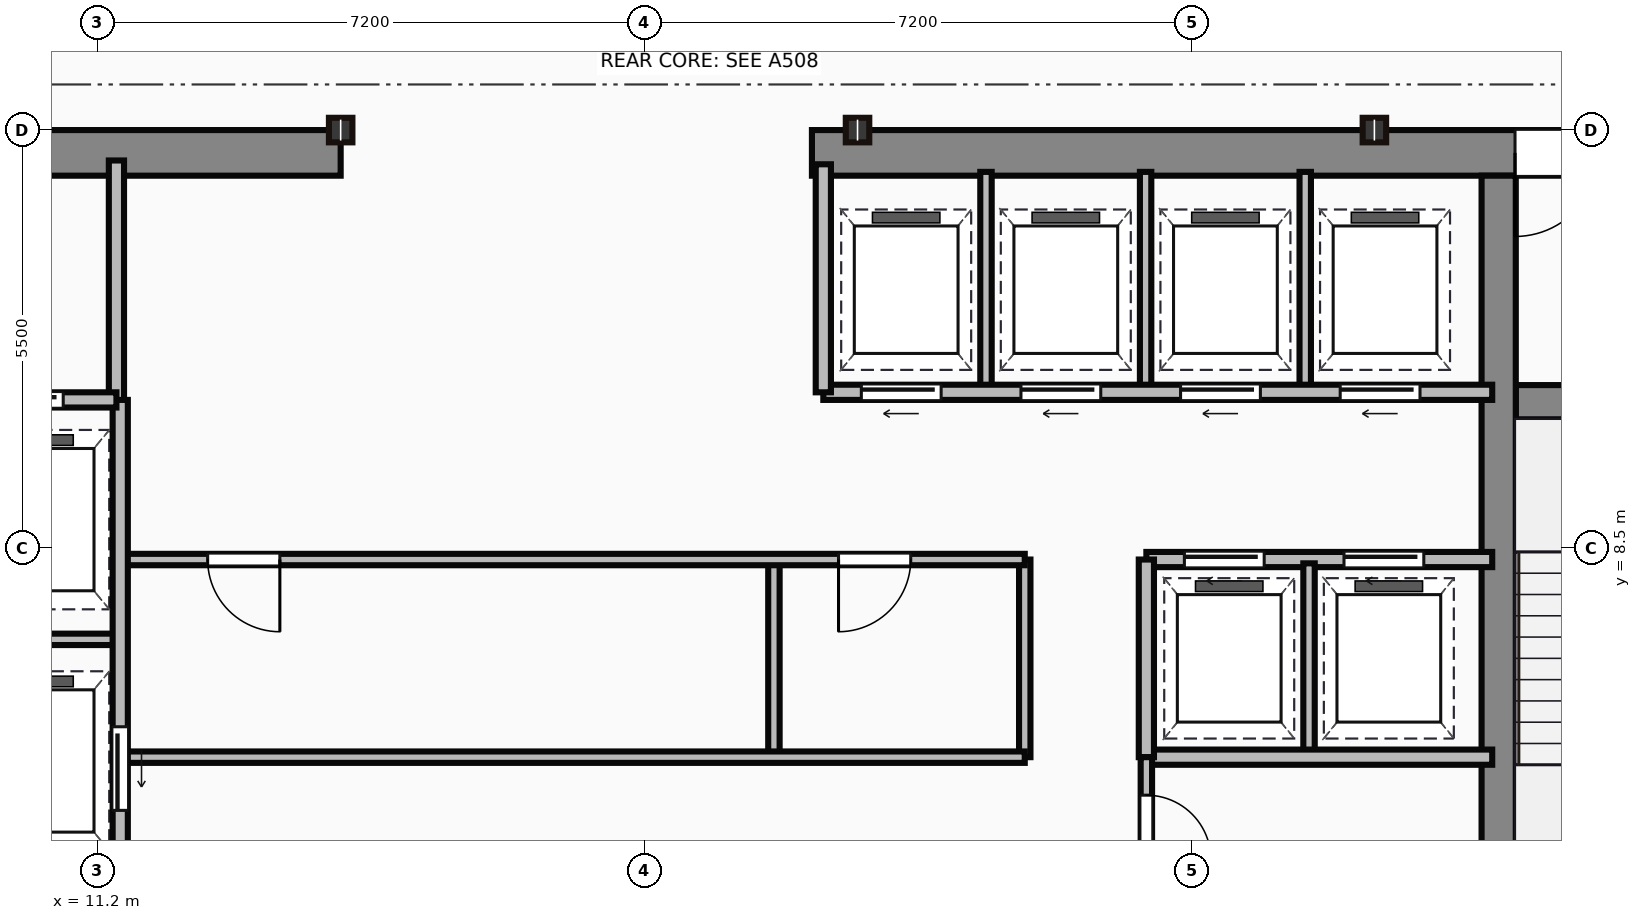
"""IFC4 building model, lengths in metres.
Left out: names, types, materials, properties, quantities, classifications, styles, units other than length and angle.
Written with IfcOpenShell. Run it as: python <this file> out.ifc"""

import sys

from ifc_helpers import new_model, si_unit, direction, frame, frame_2d, origin, origin_2d, place, context, subcontext, project, spatial, rectangle, i_section, extrude, source, transform, mapped, element, fill, save


model = new_model("IFC4")
c1 = context("Model", 3, precision=1e-05, world=origin(), true_north=direction((0.0, 1.0)))
c2 = subcontext(c1, "Body", "Model", "MODEL_VIEW")
j1 = project(units=[si_unit("LENGTHUNIT", "METRE"), si_unit("PLANEANGLEUNIT", "RADIAN")], contexts=[c1])
p1 = place(None, origin())
s1 = spatial("IfcSite", under=j1, at=p1, CompositionType="ELEMENT")
p2 = place(p1, origin())
s2 = spatial("IfcBuilding", under=s1, at=p2, CompositionType="ELEMENT")
p3 = place(p2, frame((0.0, 0.0, 195.9)))
s3 = spatial("IfcBuildingStorey", under=s2, at=p3, CompositionType="ELEMENT", Elevation=195.9)
m1 = source(origin(), c2, "Body", "SweptSolid", [
    extrude(rectangle(XDim=9.1, YDim=0.6, at=frame_2d((4.55, 0.0))), origin(), (0.0, 0.0, 1.0), 3.65),
])
p4 = place(p3, frame((5.3, 13.7, 0.0), z_axis=(0.0, 0.0, 1.0), x_axis=(1.0, 0.0, 0.0)))
e1 = element("IfcWall", 1, at=p4, inside=s3, PredefinedType="SHEAR", context=c2, shape_type="MappedRepresentation", body=[
    mapped(m1, transform((0.0, 0.0, 0.0))),
])
p5 = place(p4, frame((4.1, 0.0, 0.0)))
e2 = element("IfcOpeningElement", 2, at=p5, cuts=e1, PredefinedType="OPENING", context=c2, shape_type="SweptSolid", body=[
    extrude(rectangle(XDim=1.1, YDim=2.15, at=frame_2d((0.55, 1.075))), frame((0.0, 0.31, 0.0), z_axis=(0.0, -1.0, 0.0), x_axis=(1.0, 0.0, 0.0)), (0.0, 0.0, 1.0), 0.62),
])
m2 = source(origin(), c2, "Body", "SweptSolid", [
    extrude(rectangle(XDim=12.6, YDim=0.6, at=frame_2d((6.3, 0.0))), origin(), (0.0, 0.0, 1.0), 3.65),
])
p6 = place(p3, frame((20.6, 13.7, 0.0), z_axis=(0.0, 0.0, 1.0), x_axis=(1.0, 0.0, 0.0)))
e3 = element("IfcWall", 3, at=p6, inside=s3, PredefinedType="SHEAR", context=c2, shape_type="MappedRepresentation", body=[
    mapped(m2, transform((0.0, 0.0, 0.0))),
])
p7 = place(p6, frame((9.25, 0.0, 0.0)))
e4 = element("IfcOpeningElement", 4, at=p7, cuts=e3, PredefinedType="OPENING", context=c2, shape_type="SweptSolid", body=[
    extrude(rectangle(XDim=1.1, YDim=2.15, at=frame_2d((0.55, 1.075))), frame((0.0, 0.31, 0.0), z_axis=(0.0, -1.0, 0.0), x_axis=(1.0, 0.0, 0.0)), (0.0, 0.0, 1.0), 0.62),
])
m3 = source(origin(), c2, "Body", "SweptSolid", [
    extrude(rectangle(XDim=12.5, YDim=0.45, at=frame_2d((6.25, 0.0))), origin(), (0.0, 0.0, 1.0), 3.65),
])
p8 = place(p3, frame((29.635, 0.9, 0.0), z_axis=(0.0, 0.0, 1.0), x_axis=(0.0, 1.0, 0.0)))
e5 = element("IfcWall", 5, at=p8, inside=s3, PredefinedType="SHEAR", context=c2, shape_type="MappedRepresentation", body=[
    mapped(m3, transform((0.0, 0.0, 0.0))),
])
m4 = source(origin(), c2, "Body", "SweptSolid", [
    extrude(rectangle(XDim=3.39, YDim=0.45, at=frame_2d((1.695, 0.0))), origin(), (0.0, 0.0, 1.0), 3.65),
])
p9 = place(p3, frame((29.86, 10.42, 0.0), z_axis=(0.0, 0.0, 1.0), x_axis=(1.0, 0.0, 0.0)))
e6 = element("IfcWall", 6, at=p9, inside=s3, PredefinedType="SHEAR", context=c2, shape_type="MappedRepresentation", body=[
    mapped(m4, transform((0.0, 0.0, 0.0))),
])
p10 = place(p9, frame((1.1, 0.0, 0.0)))
e7 = element("IfcOpeningElement", 7, at=p10, cuts=e6, PredefinedType="OPENING", context=c2, shape_type="SweptSolid", body=[
    extrude(rectangle(XDim=1.1, YDim=2.15, at=frame_2d((0.55, 1.075))), frame((0.0, 0.235, 0.0), z_axis=(0.0, -1.0, 0.0), x_axis=(1.0, 0.0, 0.0)), (0.0, 0.0, 1.0), 0.47),
])
m5 = source(origin(), c2, "Body", "SweptSolid", [
    extrude(i_section(OverallWidth=0.309, OverallDepth=0.323, WebThickness=0.014, FlangeThickness=0.023, at=origin_2d()), origin(), (0.0, 0.0, 1.0), 3.65),
])
for number, where, z_axis, x_axis in (
    (8, (14.4, 14.0, 0.0), (0.0, 0.0, 1.0), (1.0, 0.0, 0.0)),
    (9, (21.2, 14.0, 0.0), (0.0, 0.0, 1.0), (1.0, 0.0, 0.0)),
    (10, (28.0, 14.0, 0.0), (0.0, 0.0, 1.0), (1.0, 0.0, 0.0)),
):
    element("IfcColumn", number, at=place(p3, frame(where, z_axis=z_axis, x_axis=x_axis)), inside=s3, PredefinedType="COLUMN", context=c2, shape_type="MappedRepresentation", body=[
        mapped(m5, transform((0.0, 0.0, 0.0))),
    ])
m6 = source(origin(), c2, "Body", "SweptSolid", [
    extrude(rectangle(XDim=3.18, YDim=0.2, at=frame_2d((1.59, 0.0))), origin(), (0.0, 0.0, 1.0), 3.4),
])
p11 = place(p3, frame((11.45, 10.42, 0.0), z_axis=(0.0, 0.0, 1.0), x_axis=(0.0, 1.0, 0.0)))
e11 = element("IfcWall", 11, at=p11, inside=s3, PredefinedType="PARTITIONING", context=c2, shape_type="MappedRepresentation", body=[
    mapped(m6, transform((0.0, 0.0, 0.0))),
])
m7 = source(origin(), c2, "Body", "SweptSolid", [
    extrude(rectangle(XDim=2.35, YDim=0.2, at=frame_2d((1.175, 0.0))), origin(), (0.0, 0.0, 1.0), 3.4),
])
p12 = place(p3, frame((9.1, 10.45, 0.0), z_axis=(0.0, 0.0, 1.0), x_axis=(1.0, 0.0, 0.0)))
e12 = element("IfcWall", 12, at=p12, inside=s3, PredefinedType="PARTITIONING", context=c2, shape_type="MappedRepresentation", body=[
    mapped(m7, transform((0.0, 0.0, 0.0))),
])
p13 = place(p12, frame((0.55, 0.0, 0.0)))
e13 = element("IfcOpeningElement", 13, at=p13, cuts=e12, PredefinedType="OPENING", context=c2, shape_type="SweptSolid", body=[
    extrude(rectangle(XDim=1.1, YDim=2.15, at=frame_2d((0.55, 1.075))), frame((0.0, 0.11, 0.0), z_axis=(0.0, -1.0, 0.0), x_axis=(1.0, 0.0, 0.0)), (0.0, 0.0, 1.0), 0.22),
])
m8 = source(origin(), c2, "Body", "SweptSolid", [
    extrude(rectangle(XDim=9.6, YDim=0.2, at=frame_2d((4.8, 0.0))), origin(), (0.0, 0.0, 1.0), 3.4),
])
p14 = place(p3, frame((11.5, 0.85, 0.0), z_axis=(0.0, 0.0, 1.0), x_axis=(0.0, 1.0, 0.0)))
e14 = element("IfcWall", 14, at=p14, inside=s3, PredefinedType="PARTITIONING", context=c2, shape_type="MappedRepresentation", body=[
    mapped(m8, transform((0.0, 0.0, 0.0))),
])
p15 = place(p14, frame((4.2, 0.0, 0.0)))
e15 = element("IfcOpeningElement", 15, at=p15, cuts=e14, PredefinedType="OPENING", context=c2, shape_type="SweptSolid", body=[
    extrude(rectangle(XDim=1.1, YDim=2.15, at=frame_2d((0.55, 1.075))), frame((0.0, 0.11, 0.0), z_axis=(0.0, -1.0, 0.0), x_axis=(1.0, 0.0, 0.0)), (0.0, 0.0, 1.0), 0.22),
])
p16 = place(p14, frame((0.9, 0.0, 0.0)))
e16 = element("IfcOpeningElement", 16, at=p16, cuts=e14, PredefinedType="OPENING", context=c2, shape_type="SweptSolid", body=[
    extrude(rectangle(XDim=1.2, YDim=2.15, at=frame_2d((0.6, 1.075))), frame((0.0, 0.11, 0.0), z_axis=(0.0, -1.0, 0.0), x_axis=(1.0, 0.0, 0.0)), (0.0, 0.0, 1.0), 0.22),
])
m9 = source(origin(), c2, "Body", "SweptSolid", [
    extrude(rectangle(XDim=2.4, YDim=0.15, at=frame_2d((1.2, 0.0))), origin(), (0.0, 0.0, 1.0), 3.4),
])
p17 = place(p3, frame((9.1, 7.3, 0.0), z_axis=(0.0, 0.0, 1.0), x_axis=(1.0, 0.0, 0.0)))
e17 = element("IfcWall", 17, at=p17, inside=s3, PredefinedType="PARTITIONING", context=c2, shape_type="MappedRepresentation", body=[
    mapped(m9, transform((0.0, 0.0, 0.0))),
])
m10 = source(origin(), c2, "Body", "SweptSolid", [
    extrude(rectangle(XDim=11.85, YDim=0.15, at=frame_2d((5.925, 0.0))), origin(), (0.0, 0.0, 1.0), 3.4),
])
p18 = place(p3, frame((11.55, 5.75, 0.0), z_axis=(0.0, 0.0, 1.0), x_axis=(1.0, 0.0, 0.0)))
e18 = element("IfcWall", 18, at=p18, inside=s3, PredefinedType="PARTITIONING", context=c2, shape_type="MappedRepresentation", body=[
    mapped(m10, transform((0.0, 0.0, 0.0))),
])
p19 = place(p3, frame((11.55, 8.35, 0.0), z_axis=(0.0, 0.0, 1.0), x_axis=(1.0, 0.0, 0.0)))
e19 = element("IfcWall", 19, at=p19, inside=s3, PredefinedType="PARTITIONING", context=c2, shape_type="MappedRepresentation", body=[
    mapped(m10, transform((0.0, 0.0, 0.0))),
])
p20 = place(p19, frame((1.1, 0.0, 0.0)))
e20 = element("IfcOpeningElement", 20, at=p20, cuts=e19, PredefinedType="OPENING", context=c2, shape_type="SweptSolid", body=[
    extrude(rectangle(XDim=0.95, YDim=2.15, at=frame_2d((0.475, 1.075))), frame((0.0, 0.085, 0.0), z_axis=(0.0, -1.0, 0.0), x_axis=(1.0, 0.0, 0.0)), (0.0, 0.0, 1.0), 0.17),
])
p21 = place(p19, frame((9.4, 0.0, 0.0)))
e21 = element("IfcOpeningElement", 21, at=p21, cuts=e19, PredefinedType="OPENING", context=c2, shape_type="SweptSolid", body=[
    extrude(rectangle(XDim=0.95, YDim=2.15, at=frame_2d((0.475, 1.075))), frame((0.0, 0.085, 0.0), z_axis=(0.0, -1.0, 0.0), x_axis=(1.0, 0.0, 0.0)), (0.0, 0.0, 1.0), 0.17),
])
m11 = source(origin(), c2, "Body", "SweptSolid", [
    extrude(rectangle(XDim=2.6, YDim=0.15, at=frame_2d((1.3, 0.0))), origin(), (0.0, 0.0, 1.0), 3.4),
])
p22 = place(p3, frame((23.4, 5.75, 0.0), z_axis=(0.0, 0.0, 1.0), x_axis=(0.0, 1.0, 0.0)))
e22 = element("IfcWall", 22, at=p22, inside=s3, PredefinedType="PARTITIONING", context=c2, shape_type="MappedRepresentation", body=[
    mapped(m11, transform((0.0, 0.0, 0.0))),
])
m12 = source(origin(), c2, "Body", "SweptSolid", [
    extrude(rectangle(XDim=2.5, YDim=0.15, at=frame_2d((1.25, 0.0))), origin(), (0.0, 0.0, 1.0), 3.4),
])
p23 = place(p3, frame((20.1, 5.8, 0.0), z_axis=(0.0, 0.0, 1.0), x_axis=(0.0, 1.0, 0.0)))
e23 = element("IfcWall", 23, at=p23, inside=s3, PredefinedType="PARTITIONING", context=c2, shape_type="MappedRepresentation", body=[
    mapped(m12, transform((0.0, 0.0, 0.0))),
])
m13 = source(origin(), c2, "Body", "SweptSolid", [
    extrude(rectangle(XDim=8.8, YDim=0.2, at=frame_2d((4.4, 0.0))), origin(), (0.0, 0.0, 1.0), 3.4),
])
p24 = place(p3, frame((20.75, 10.55, 0.0), z_axis=(0.0, 0.0, 1.0), x_axis=(1.0, 0.0, 0.0)))
e24 = element("IfcWall", 24, at=p24, inside=s3, PredefinedType="PARTITIONING", context=c2, shape_type="MappedRepresentation", body=[
    mapped(m13, transform((0.0, 0.0, 0.0))),
])
p25 = place(p24, frame((0.5, 0.0, 0.0)))
e25 = element("IfcOpeningElement", 25, at=p25, cuts=e24, PredefinedType="OPENING", context=c2, shape_type="SweptSolid", body=[
    extrude(rectangle(XDim=1.05, YDim=2.15, at=frame_2d((0.525, 1.075))), frame((0.0, 0.11, 0.0), z_axis=(0.0, -1.0, 0.0), x_axis=(1.0, 0.0, 0.0)), (0.0, 0.0, 1.0), 0.22),
])
p26 = place(p24, frame((2.6, 0.0, 0.0)))
e26 = element("IfcOpeningElement", 26, at=p26, cuts=e24, PredefinedType="OPENING", context=c2, shape_type="SweptSolid", body=[
    extrude(rectangle(XDim=1.05, YDim=2.15, at=frame_2d((0.525, 1.075))), frame((0.0, 0.11, 0.0), z_axis=(0.0, -1.0, 0.0), x_axis=(1.0, 0.0, 0.0)), (0.0, 0.0, 1.0), 0.22),
])
p27 = place(p24, frame((4.7, 0.0, 0.0)))
e27 = element("IfcOpeningElement", 27, at=p27, cuts=e24, PredefinedType="OPENING", context=c2, shape_type="SweptSolid", body=[
    extrude(rectangle(XDim=1.05, YDim=2.15, at=frame_2d((0.525, 1.075))), frame((0.0, 0.11, 0.0), z_axis=(0.0, -1.0, 0.0), x_axis=(1.0, 0.0, 0.0)), (0.0, 0.0, 1.0), 0.22),
])
p28 = place(p24, frame((6.8, 0.0, 0.0)))
e28 = element("IfcOpeningElement", 28, at=p28, cuts=e24, PredefinedType="OPENING", context=c2, shape_type="SweptSolid", body=[
    extrude(rectangle(XDim=1.05, YDim=2.15, at=frame_2d((0.525, 1.075))), frame((0.0, 0.11, 0.0), z_axis=(0.0, -1.0, 0.0), x_axis=(1.0, 0.0, 0.0)), (0.0, 0.0, 1.0), 0.22),
])
m14 = source(origin(), c2, "Body", "SweptSolid", [
    extrude(rectangle(XDim=3.0, YDim=0.2, at=frame_2d((1.5, 0.0))), origin(), (0.0, 0.0, 1.0), 3.4),
])
p29 = place(p3, frame((20.75, 10.55, 0.0), z_axis=(0.0, 0.0, 1.0), x_axis=(0.0, 1.0, 0.0)))
e29 = element("IfcWall", 29, at=p29, inside=s3, PredefinedType="PARTITIONING", context=c2, shape_type="MappedRepresentation", body=[
    mapped(m14, transform((0.0, 0.0, 0.0))),
])
m15 = source(origin(), c2, "Body", "SweptSolid", [
    extrude(rectangle(XDim=2.85, YDim=0.15, at=frame_2d((1.425, 0.0))), origin(), (0.0, 0.0, 1.0), 3.4),
])
for number, where, z_axis, x_axis in (
    (30, (22.89, 10.6, 0.0), (0.0, 0.0, 1.0), (0.0, 1.0, 0.0)),
    (31, (24.99, 10.6, 0.0), (0.0, 0.0, 1.0), (0.0, 1.0, 0.0)),
    (32, (27.09, 10.6, 0.0), (0.0, 0.0, 1.0), (0.0, 1.0, 0.0)),
):
    element("IfcWall", number, at=place(p3, frame(where, z_axis=z_axis, x_axis=x_axis)), inside=s3, PredefinedType="PARTITIONING", context=c2, shape_type="MappedRepresentation", body=[
        mapped(m15, transform((0.0, 0.0, 0.0))),
    ])
m16 = source(origin(), c2, "Body", "SweptSolid", [
    extrude(rectangle(XDim=4.55, YDim=0.2, at=frame_2d((2.275, 0.0))), origin(), (0.0, 0.0, 1.0), 3.4),
])
p30 = place(p3, frame((25.0, 8.35, 0.0), z_axis=(0.0, 0.0, 1.0), x_axis=(1.0, 0.0, 0.0)))
e33 = element("IfcWall", 33, at=p30, inside=s3, PredefinedType="PARTITIONING", context=c2, shape_type="MappedRepresentation", body=[
    mapped(m16, transform((0.0, 0.0, 0.0))),
])
p31 = place(p30, frame((0.5, 0.0, 0.0)))
e34 = element("IfcOpeningElement", 34, at=p31, cuts=e33, PredefinedType="OPENING", context=c2, shape_type="SweptSolid", body=[
    extrude(rectangle(XDim=1.05, YDim=2.15, at=frame_2d((0.525, 1.075))), frame((0.0, 0.11, 0.0), z_axis=(0.0, -1.0, 0.0), x_axis=(1.0, 0.0, 0.0)), (0.0, 0.0, 1.0), 0.22),
])
p32 = place(p30, frame((2.6, 0.0, 0.0)))
e35 = element("IfcOpeningElement", 35, at=p32, cuts=e33, PredefinedType="OPENING", context=c2, shape_type="SweptSolid", body=[
    extrude(rectangle(XDim=1.05, YDim=2.15, at=frame_2d((0.525, 1.075))), frame((0.0, 0.11, 0.0), z_axis=(0.0, -1.0, 0.0), x_axis=(1.0, 0.0, 0.0)), (0.0, 0.0, 1.0), 0.22),
])
p33 = place(p3, frame((25.0, 5.75, 0.0), z_axis=(0.0, 0.0, 1.0), x_axis=(1.0, 0.0, 0.0)))
e36 = element("IfcWall", 36, at=p33, inside=s3, PredefinedType="PARTITIONING", context=c2, shape_type="MappedRepresentation", body=[
    mapped(m16, transform((0.0, 0.0, 0.0))),
])
m17 = source(origin(), c2, "Body", "SweptSolid", [
    extrude(rectangle(XDim=2.6, YDim=0.2, at=frame_2d((1.3, 0.0))), origin(), (0.0, 0.0, 1.0), 3.4),
])
p34 = place(p3, frame((25.0, 5.75, 0.0), z_axis=(0.0, 0.0, 1.0), x_axis=(0.0, 1.0, 0.0)))
e37 = element("IfcWall", 37, at=p34, inside=s3, PredefinedType="PARTITIONING", context=c2, shape_type="MappedRepresentation", body=[
    mapped(m17, transform((0.0, 0.0, 0.0))),
])
p35 = place(p3, frame((27.14, 5.8, 0.0), z_axis=(0.0, 0.0, 1.0), x_axis=(0.0, 1.0, 0.0)))
e38 = element("IfcWall", 38, at=p35, inside=s3, PredefinedType="PARTITIONING", context=c2, shape_type="MappedRepresentation", body=[
    mapped(m12, transform((0.0, 0.0, 0.0))),
])
m18 = source(origin(), c2, "Body", "SweptSolid", [
    extrude(rectangle(XDim=4.9, YDim=0.15, at=frame_2d((2.45, 0.0))), origin(), (0.0, 0.0, 1.0), 3.4),
])
p36 = place(p3, frame((25.0, 0.85, 0.0), z_axis=(0.0, 0.0, 1.0), x_axis=(0.0, 1.0, 0.0)))
e39 = element("IfcWall", 39, at=p36, inside=s3, PredefinedType="PARTITIONING", context=c2, shape_type="MappedRepresentation", body=[
    mapped(m18, transform((0.0, 0.0, 0.0))),
])
p37 = place(p36, frame((1.85, 0.0, 0.0)))
e40 = element("IfcOpeningElement", 40, at=p37, cuts=e39, PredefinedType="OPENING", context=c2, shape_type="SweptSolid", body=[
    extrude(rectangle(XDim=0.95, YDim=2.15, at=frame_2d((0.475, 1.075))), frame((0.0, 0.085, 0.0), z_axis=(0.0, -1.0, 0.0), x_axis=(1.0, 0.0, 0.0)), (0.0, 0.0, 1.0), 0.17),
])
p38 = place(p36, frame((3.55, 0.0, 0.0)))
e41 = element("IfcOpeningElement", 41, at=p38, cuts=e39, PredefinedType="OPENING", context=c2, shape_type="SweptSolid", body=[
    extrude(rectangle(XDim=0.85, YDim=2.15, at=frame_2d((0.425, 1.075))), frame((0.0, 0.085, 0.0), z_axis=(0.0, -1.0, 0.0), x_axis=(1.0, 0.0, 0.0)), (0.0, 0.0, 1.0), 0.17),
])
m19 = source(origin(), c2, "Body", "SweptSolid", [
    extrude(rectangle(XDim=1.1, YDim=2.15, at=frame_2d((0.55, 1.075))), frame((0.0, 0.025, 0.0), z_axis=(0.0, -1.0, 0.0), x_axis=(1.0, 0.0, 0.0)), (0.0, 0.0, 1.0), 0.05),
])
p39 = place(p7, origin())
e42 = element("IfcDoor", 42, at=p39, inside=s3, OperationType="SINGLE_SWING_LEFT", PredefinedType="DOOR", context=c2, shape_type="MappedRepresentation", body=[
    mapped(m19, transform((0.0, 0.0, 0.0))),
])
fill(e4, e42)
p40 = place(p13, origin())
e43 = element("IfcDoor", 43, at=p40, inside=s3, OperationType="SLIDING_TO_LEFT", PredefinedType="DOOR", context=c2, shape_type="MappedRepresentation", body=[
    mapped(m19, transform((0.0, 0.0, 0.0))),
])
fill(e13, e43)
p41 = place(p15, frame((1.1, 0.0, 0.0), z_axis=(0.0, 0.0, 1.0), x_axis=(-1.0, 0.0, 0.0)))
e44 = element("IfcDoor", 44, at=p41, inside=s3, OperationType="SLIDING_TO_LEFT", PredefinedType="DOOR", context=c2, shape_type="MappedRepresentation", body=[
    mapped(m19, transform((0.0, 0.0, 0.0))),
])
fill(e15, e44)
m20 = source(origin(), c2, "Body", "SweptSolid", [
    extrude(rectangle(XDim=0.95, YDim=2.15, at=frame_2d((0.475, 1.075))), frame((0.0, 0.025, 0.0), z_axis=(0.0, -1.0, 0.0), x_axis=(1.0, 0.0, 0.0)), (0.0, 0.0, 1.0), 0.05),
])
p42 = place(p20, origin())
e45 = element("IfcDoor", 45, at=p42, inside=s3, OperationType="SINGLE_SWING_RIGHT", PredefinedType="DOOR", context=c2, shape_type="MappedRepresentation", body=[
    mapped(m20, transform((0.0, 0.0, 0.0))),
])
fill(e20, e45)
p43 = place(p21, origin())
e46 = element("IfcDoor", 46, at=p43, inside=s3, OperationType="SINGLE_SWING_LEFT", PredefinedType="DOOR", context=c2, shape_type="MappedRepresentation", body=[
    mapped(m20, transform((0.0, 0.0, 0.0))),
])
fill(e21, e46)
m21 = source(origin(), c2, "Body", "SweptSolid", [
    extrude(rectangle(XDim=1.05, YDim=2.15, at=frame_2d((0.525, 1.075))), frame((0.0, 0.025, 0.0), z_axis=(0.0, -1.0, 0.0), x_axis=(1.0, 0.0, 0.0)), (0.0, 0.0, 1.0), 0.05),
])
p44 = place(p25, frame((1.05, 0.0, 0.0), z_axis=(0.0, 0.0, 1.0), x_axis=(-1.0, 0.0, 0.0)))
e47 = element("IfcDoor", 47, at=p44, inside=s3, OperationType="SLIDING_TO_LEFT", PredefinedType="DOOR", context=c2, shape_type="MappedRepresentation", body=[
    mapped(m21, transform((0.0, 0.0, 0.0))),
])
fill(e25, e47)
p45 = place(p26, frame((1.05, 0.0, 0.0), z_axis=(0.0, 0.0, 1.0), x_axis=(-1.0, 0.0, 0.0)))
e48 = element("IfcDoor", 48, at=p45, inside=s3, OperationType="SLIDING_TO_LEFT", PredefinedType="DOOR", context=c2, shape_type="MappedRepresentation", body=[
    mapped(m21, transform((0.0, 0.0, 0.0))),
])
fill(e26, e48)
p46 = place(p27, frame((1.05, 0.0, 0.0), z_axis=(0.0, 0.0, 1.0), x_axis=(-1.0, 0.0, 0.0)))
e49 = element("IfcDoor", 49, at=p46, inside=s3, OperationType="SLIDING_TO_LEFT", PredefinedType="DOOR", context=c2, shape_type="MappedRepresentation", body=[
    mapped(m21, transform((0.0, 0.0, 0.0))),
])
fill(e27, e49)
p47 = place(p28, frame((1.05, 0.0, 0.0), z_axis=(0.0, 0.0, 1.0), x_axis=(-1.0, 0.0, 0.0)))
e50 = element("IfcDoor", 50, at=p47, inside=s3, OperationType="SLIDING_TO_LEFT", PredefinedType="DOOR", context=c2, shape_type="MappedRepresentation", body=[
    mapped(m21, transform((0.0, 0.0, 0.0))),
])
fill(e28, e50)
p48 = place(p31, origin())
e51 = element("IfcDoor", 51, at=p48, inside=s3, OperationType="SLIDING_TO_LEFT", PredefinedType="DOOR", context=c2, shape_type="MappedRepresentation", body=[
    mapped(m21, transform((0.0, 0.0, 0.0))),
])
fill(e34, e51)
p49 = place(p32, origin())
e52 = element("IfcDoor", 52, at=p49, inside=s3, OperationType="SLIDING_TO_LEFT", PredefinedType="DOOR", context=c2, shape_type="MappedRepresentation", body=[
    mapped(m21, transform((0.0, 0.0, 0.0))),
])
fill(e35, e52)
m22 = source(origin(), c2, "Body", "SweptSolid", [
    extrude(rectangle(XDim=0.85, YDim=2.15, at=frame_2d((0.425, 1.075))), frame((0.0, 0.025, 0.0), z_axis=(0.0, -1.0, 0.0), x_axis=(1.0, 0.0, 0.0)), (0.0, 0.0, 1.0), 0.05),
])
p50 = place(p38, origin())
e53 = element("IfcDoor", 53, at=p50, inside=s3, OperationType="SINGLE_SWING_LEFT", PredefinedType="DOOR", context=c2, shape_type="MappedRepresentation", body=[
    mapped(m22, transform((0.0, 0.0, 0.0))),
])
fill(e41, e53)
save(model, sys.argv[1])
